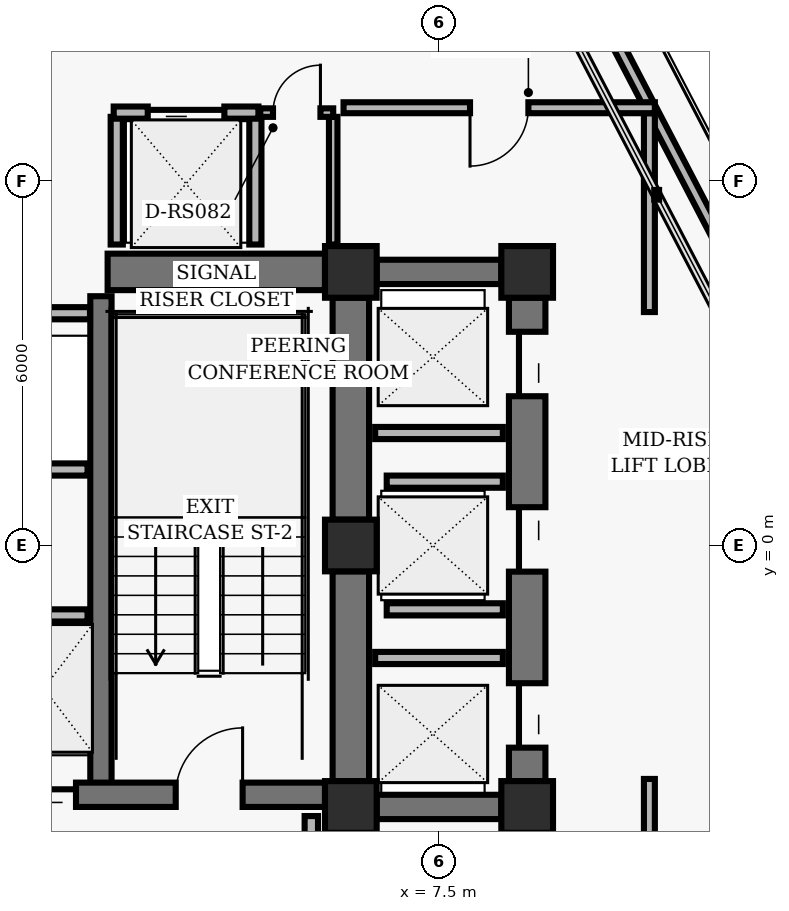
"""IFC4 building model, lengths in metres.
Left out: names, types, materials, properties, quantities, classifications, styles, units other than length and angle.
Written with IfcOpenShell. Run it as: python <this file> out.ifc"""

import sys

from ifc_helpers import new_model, si_unit, direction, frame, frame_2d, origin, origin_2d, place, context, subcontext, project, spatial, rectangle, hollow_rectangle, extrude, element, fill, save


model = new_model("IFC4")
c1 = context("Model", 3, precision=1e-05, world=origin(), true_north=direction((0.0, 1.0)))
c2 = subcontext(c1, "Body", "Model", "MODEL_VIEW")
j1 = project(units=[si_unit("LENGTHUNIT", "METRE"), si_unit("PLANEANGLEUNIT", "RADIAN")], contexts=[c1])
p1 = place(None, origin())
s1 = spatial("IfcSite", under=j1, at=p1, CompositionType="ELEMENT")
p2 = place(p1, origin())
s2 = spatial("IfcBuilding", under=s1, at=p2, CompositionType="ELEMENT")
p3 = place(p2, frame((0.0, 0.0, 125.92)))
s3 = spatial("IfcBuildingStorey", under=s2, at=p3, CompositionType="ELEMENT", Elevation=125.92)
for number, where, z_axis, x_axis in (
    (1, (6.05, 4.5, 0.0), (0.0, 0.0, 1.0), (1.0, 0.0, 0.0)),
    (2, (6.05, 0.0, 0.0), (0.0, 0.0, 1.0), (1.0, 0.0, 0.0)),
    (3, (6.05, -4.3, 0.0), (0.0, 0.0, 1.0), (1.0, 0.0, 0.0)),
    (4, (8.95, 4.5, 0.0), (0.0, 0.0, 1.0), (1.0, 0.0, 0.0)),
    (5, (8.95, -4.3, 0.0), (0.0, 0.0, 1.0), (1.0, 0.0, 0.0)),
):
    element("IfcColumn", number, at=place(p3, frame(where, z_axis=z_axis, x_axis=x_axis)), inside=s3, PredefinedType="COLUMN", context=c2, shape_type="SweptSolid", body=[
        extrude(hollow_rectangle(XDim=0.85, YDim=0.85, WallThickness=0.055, InnerFilletRadius=0.02, OuterFilletRadius=0.04, at=origin_2d()), origin(), (0.0, 0.0, 1.0), 3.04),
    ])
p4 = place(p3, frame((6.05, 0.425, 0.0), z_axis=(0.0, 0.0, 1.0), x_axis=(0.0, 1.0, 0.0)))
e6 = element("IfcWall", 6, at=p4, inside=s3, PredefinedType="SHEAR", context=c2, shape_type="SweptSolid", body=[
    extrude(rectangle(XDim=3.65, YDim=0.6, at=frame_2d((1.825, 0.0))), origin(), (0.0, 0.0, 1.0), 2.788),
])
p5 = place(p3, frame((6.05, -3.875, 0.0), z_axis=(0.0, 0.0, 1.0), x_axis=(0.0, 1.0, 0.0)))
e7 = element("IfcWall", 7, at=p5, inside=s3, PredefinedType="SHEAR", context=c2, shape_type="SweptSolid", body=[
    extrude(rectangle(XDim=3.45, YDim=0.6, at=frame_2d((1.725, 0.0))), origin(), (0.0, 0.0, 1.0), 2.788),
])
p6 = place(p3, frame((1.94, -4.1, 0.0), z_axis=(0.0, 0.0, 1.0), x_axis=(0.0, 1.0, 0.0)))
e8 = element("IfcWall", 8, at=p6, inside=s3, PredefinedType="SHEAR", context=c2, shape_type="SweptSolid", body=[
    extrude(rectangle(XDim=8.2, YDim=0.35, at=frame_2d((4.1, 0.0))), origin(), (0.0, 0.0, 1.0), 2.788),
])
p7 = place(p3, frame((-5.625, -4.1, 0.0), z_axis=(0.0, 0.0, 1.0), x_axis=(1.0, 0.0, 0.0)))
e9 = element("IfcWall", 9, at=p7, inside=s3, PredefinedType="SHEAR", context=c2, shape_type="SweptSolid", body=[
    extrude(rectangle(XDim=11.25, YDim=0.4, at=frame_2d((5.625, 0.0))), origin(), (0.0, 0.0, 1.0), 2.788),
])
p8 = place(p7, frame((1.355, 0.0, 0.0)))
e10 = element("IfcOpeningElement", 10, at=p8, cuts=e9, PredefinedType="OPENING", context=c2, shape_type="SweptSolid", body=[
    extrude(rectangle(XDim=1.1, YDim=2.04, at=frame_2d((0.55, 1.02))), frame((0.0, 0.21, 0.0), z_axis=(0.0, -1.0, 0.0), x_axis=(1.0, 0.0, 0.0)), (0.0, 0.0, 1.0), 0.42),
])
p9 = place(p7, frame((8.795, 0.0, 0.0)))
e11 = element("IfcOpeningElement", 11, at=p9, cuts=e9, PredefinedType="OPENING", context=c2, shape_type="SweptSolid", body=[
    extrude(rectangle(XDim=1.1, YDim=2.04, at=frame_2d((0.55, 1.02))), frame((0.0, 0.21, 0.0), z_axis=(0.0, -1.0, 0.0), x_axis=(1.0, 0.0, 0.0)), (0.0, 0.0, 1.0), 0.42),
])
p10 = place(p7, frame((4.095, 0.0, 0.0)))
e12 = element("IfcOpeningElement", 12, at=p10, cuts=e9, PredefinedType="OPENING", context=c2, shape_type="SweptSolid", body=[
    extrude(rectangle(XDim=1.06, YDim=2.04, at=frame_2d((0.53, 1.02))), frame((0.0, 0.21, 0.0), z_axis=(0.0, -1.0, 0.0), x_axis=(1.0, 0.0, 0.0)), (0.0, 0.0, 1.0), 0.42),
])
p11 = place(p7, frame((6.095, 0.0, 0.0)))
e13 = element("IfcOpeningElement", 13, at=p11, cuts=e9, PredefinedType="OPENING", context=c2, shape_type="SweptSolid", body=[
    extrude(rectangle(XDim=1.06, YDim=2.04, at=frame_2d((0.53, 1.02))), frame((0.0, 0.21, 0.0), z_axis=(0.0, -1.0, 0.0), x_axis=(1.0, 0.0, 0.0)), (0.0, 0.0, 1.0), 0.42),
])
p12 = place(p3, frame((2.05, 4.5, 0.0), z_axis=(0.0, 0.0, 1.0), x_axis=(1.0, 0.0, 0.0)))
e14 = element("IfcWall", 14, at=p12, inside=s3, PredefinedType="SHEAR", context=c2, shape_type="SweptSolid", body=[
    extrude(rectangle(XDim=3.575, YDim=0.6, at=frame_2d((1.788, 0.0))), origin(), (0.0, 0.0, 1.0), 2.788),
])
p13 = place(p3, frame((8.95, -3.875, 0.0), z_axis=(0.0, 0.0, 1.0), x_axis=(0.0, 1.0, 0.0)))
e15 = element("IfcWall", 15, at=p13, inside=s3, PredefinedType="SHEAR", context=c2, shape_type="SweptSolid", body=[
    extrude(rectangle(XDim=7.95, YDim=0.6, at=frame_2d((3.975, 0.0))), origin(), (0.0, 0.0, 1.0), 2.788),
])
p14 = place(p13, frame((0.55, 0.0, 0.0)))
e16 = element("IfcOpeningElement", 16, at=p14, cuts=e15, PredefinedType="OPENING", context=c2, shape_type="SweptSolid", body=[
    extrude(rectangle(XDim=1.06, YDim=2.04, at=frame_2d((0.53, 1.02))), frame((0.0, 0.31, 0.0), z_axis=(0.0, -1.0, 0.0), x_axis=(1.0, 0.0, 0.0)), (0.0, 0.0, 1.0), 0.62),
])
p15 = place(p13, frame((3.445, 0.0, 0.0)))
e17 = element("IfcOpeningElement", 17, at=p15, cuts=e15, PredefinedType="OPENING", context=c2, shape_type="SweptSolid", body=[
    extrude(rectangle(XDim=1.06, YDim=2.04, at=frame_2d((0.53, 1.02))), frame((0.0, 0.31, 0.0), z_axis=(0.0, -1.0, 0.0), x_axis=(1.0, 0.0, 0.0)), (0.0, 0.0, 1.0), 0.62),
])
p16 = place(p13, frame((6.33, 0.0, 0.0)))
e18 = element("IfcOpeningElement", 18, at=p16, cuts=e15, PredefinedType="OPENING", context=c2, shape_type="SweptSolid", body=[
    extrude(rectangle(XDim=1.06, YDim=2.04, at=frame_2d((0.53, 1.02))), frame((0.0, 0.31, 0.0), z_axis=(0.0, -1.0, 0.0), x_axis=(1.0, 0.0, 0.0)), (0.0, 0.0, 1.0), 0.62),
])
for number, where, z_axis, x_axis in (
    (19, (6.475, 4.5, 0.0), (0.0, 0.0, 1.0), (1.0, 0.0, 0.0)),
    (20, (6.475, -4.3, 0.0), (0.0, 0.0, 1.0), (1.0, 0.0, 0.0)),
):
    element("IfcWall", number, at=place(p3, frame(where, z_axis=z_axis, x_axis=x_axis)), inside=s3, PredefinedType="SHEAR", context=c2, shape_type="SweptSolid", body=[
        extrude(rectangle(XDim=2.05, YDim=0.4, at=frame_2d((1.025, 0.0))), origin(), (0.0, 0.0, 1.0), 2.788),
    ])
p17 = place(p3, frame((-1.72, -1.15, 0.0), z_axis=(0.0, 0.0, 1.0), x_axis=(1.0, 0.0, 0.0)))
e21 = element("IfcWall", 21, at=p17, inside=s3, PredefinedType="PARTITIONING", context=c2, shape_type="SweptSolid", body=[
    extrude(rectangle(XDim=3.44, YDim=0.2, at=frame_2d((1.72, 0.0))), origin(), (0.0, 0.0, 1.0), 2.763),
])
p18 = place(p3, frame((5.4, -7.16, 0.0), z_axis=(0.0, 0.0, 1.0), x_axis=(0.0, 1.0, 0.0)))
e22 = element("IfcWall", 22, at=p18, inside=s3, PredefinedType="PARTITIONING", context=c2, shape_type="SweptSolid", body=[
    extrude(rectangle(XDim=2.71, YDim=0.22, at=frame_2d((1.355, 0.0))), origin(), (0.0, 0.0, 1.0), 2.763),
])
p19 = place(p3, frame((-1.72, 1.25, 0.0), z_axis=(0.0, 0.0, 1.0), x_axis=(1.0, 0.0, 0.0)))
e23 = element("IfcWall", 23, at=p19, inside=s3, PredefinedType="PARTITIONING", context=c2, shape_type="SweptSolid", body=[
    extrude(rectangle(XDim=3.44, YDim=0.2, at=frame_2d((1.72, 0.0))), origin(), (0.0, 0.0, 1.0), 2.763),
])
p20 = place(p3, frame((-1.76, 3.82, 0.0), z_axis=(0.0, 0.0, 1.0), x_axis=(1.0, 0.0, 0.0)))
e24 = element("IfcWall", 24, at=p20, inside=s3, PredefinedType="PARTITIONING", context=c2, shape_type="SweptSolid", body=[
    extrude(rectangle(XDim=3.52, YDim=0.2, at=frame_2d((1.76, 0.0))), origin(), (0.0, 0.0, 1.0), 2.763),
])
for number, where, z_axis, x_axis in (
    (25, (2.2, 4.95, 0.0), (0.0, 0.0, 1.0), (0.0, 1.0, 0.0)),
    (26, (4.48, 4.95, 0.0), (0.0, 0.0, 1.0), (0.0, 1.0, 0.0)),
):
    element("IfcWall", number, at=place(p3, frame(where, z_axis=z_axis, x_axis=x_axis)), inside=s3, PredefinedType="PARTITIONING", context=c2, shape_type="SweptSolid", body=[
        extrude(rectangle(XDim=2.1, YDim=0.2, at=frame_2d((1.05, 0.0))), origin(), (0.0, 0.0, 1.0), 2.763),
    ])
p21 = place(p3, frame((2.15, 7.12, 0.0), z_axis=(0.0, 0.0, 1.0), x_axis=(1.0, 0.0, 0.0)))
e27 = element("IfcWall", 27, at=p21, inside=s3, PredefinedType="PARTITIONING", context=c2, shape_type="SweptSolid", body=[
    extrude(rectangle(XDim=2.38, YDim=0.2, at=frame_2d((1.19, 0.0))), origin(), (0.0, 0.0, 1.0), 2.763),
])
p22 = place(p21, frame((0.56, 0.0, 0.0)))
e28 = element("IfcOpeningElement", 28, at=p22, cuts=e27, PredefinedType="OPENING", context=c2, shape_type="SweptSolid", body=[
    extrude(rectangle(XDim=1.26, YDim=2.06, at=frame_2d((0.63, 1.03))), frame((0.0, 0.11, 0.0), z_axis=(0.0, -1.0, 0.0), x_axis=(1.0, 0.0, 0.0)), (0.0, 0.0, 1.0), 0.22),
])
p23 = place(p3, frame((5.76, 4.95, 0.0), z_axis=(0.0, 0.0, 1.0), x_axis=(0.0, 1.0, 0.0)))
e29 = element("IfcWall", 29, at=p23, inside=s3, PredefinedType="PARTITIONING", context=c2, shape_type="SweptSolid", body=[
    extrude(rectangle(XDim=2.1, YDim=0.14, at=frame_2d((1.05, 0.0))), origin(), (0.0, 0.0, 1.0), 2.763),
])
p24 = place(p3, frame((4.56, 7.12, 0.0), z_axis=(0.0, 0.0, 1.0), x_axis=(1.0, 0.0, 0.0)))
e30 = element("IfcWall", 30, at=p24, inside=s3, PredefinedType="PARTITIONING", context=c2, shape_type="SweptSolid", body=[
    extrude(rectangle(XDim=1.2, YDim=0.14, at=frame_2d((0.6, 0.0))), origin(), (0.0, 0.0, 1.0), 2.763),
])
p25 = place(p24, frame((0.21, 0.0, 0.0)))
e31 = element("IfcOpeningElement", 31, at=p25, cuts=e30, PredefinedType="OPENING", context=c2, shape_type="SweptSolid", body=[
    extrude(rectangle(XDim=0.78, YDim=2.01, at=frame_2d((0.39, 1.005))), frame((0.0, 0.08, 0.0), z_axis=(0.0, -1.0, 0.0), x_axis=(1.0, 0.0, 0.0)), (0.0, 0.0, 1.0), 0.16),
])
for number, where, z_axis, x_axis in (
    (32, (6.45, -1.85, 0.0), (0.0, 0.0, 1.0), (1.0, 0.0, 0.0)),
    (33, (6.45, 1.85, 0.0), (0.0, 0.0, 1.0), (1.0, 0.0, 0.0)),
):
    element("IfcWall", number, at=place(p3, frame(where, z_axis=z_axis, x_axis=x_axis)), inside=s3, PredefinedType="PARTITIONING", context=c2, shape_type="SweptSolid", body=[
        extrude(rectangle(XDim=2.1, YDim=0.2, at=frame_2d((1.05, 0.0))), origin(), (0.0, 0.0, 1.0), 2.763),
    ])
for number, where, z_axis, x_axis in (
    (34, (6.64, -1.05, 0.0), (0.0, 0.0, 1.0), (1.0, 0.0, 0.0)),
    (35, (6.64, 1.05, 0.0), (0.0, 0.0, 1.0), (1.0, 0.0, 0.0)),
):
    element("IfcWall", number, at=place(p3, frame(where, z_axis=z_axis, x_axis=x_axis)), inside=s3, PredefinedType="PARTITIONING", context=c2, shape_type="SweptSolid", body=[
        extrude(rectangle(XDim=1.91, YDim=0.2, at=frame_2d((0.955, 0.0))), origin(), (0.0, 0.0, 1.0), 2.763),
    ])
p26 = place(p3, frame((10.003, 9.07, 0.0), z_axis=(0.0, 0.0, 1.0), x_axis=(0.461740291408, -0.887015165198, 0.0)))
e36 = element("IfcWall", 36, at=p26, inside=s3, PredefinedType="PARTITIONING", context=c2, shape_type="SweptSolid", body=[
    extrude(rectangle(XDim=9.976, YDim=0.18, at=frame_2d((4.988, 0.0))), origin(), (0.0, 0.0, 1.0), 2.763),
])
p27 = place(p3, frame((10.96, -7.11, 0.0), z_axis=(0.0, 0.0, 1.0), x_axis=(0.0, 1.0, 0.0)))
e37 = element("IfcWall", 37, at=p27, inside=s3, PredefinedType="PARTITIONING", context=c2, shape_type="SweptSolid", body=[
    extrude(rectangle(XDim=3.271, YDim=0.18, at=frame_2d((1.635, 0.0))), origin(), (0.0, 0.0, 1.0), 2.763),
])
p28 = place(p27, frame((1.125, 0.0, 0.0)))
e38 = element("IfcOpeningElement", 38, at=p28, cuts=e37, PredefinedType="OPENING", context=c2, shape_type="SweptSolid", body=[
    extrude(rectangle(XDim=1.02, YDim=2.02, at=frame_2d((0.51, 1.01))), frame((0.0, 0.1, 0.0), z_axis=(0.0, -1.0, 0.0), x_axis=(1.0, 0.0, 0.0)), (0.0, 0.0, 1.0), 0.2),
])
p29 = place(p3, frame((10.96, 3.84, 0.0), z_axis=(0.0, 0.0, 1.0), x_axis=(0.0, 1.0, 0.0)))
e39 = element("IfcWall", 39, at=p29, inside=s3, PredefinedType="PARTITIONING", context=c2, shape_type="SweptSolid", body=[
    extrude(rectangle(XDim=3.271, YDim=0.18, at=frame_2d((1.635, 0.0))), origin(), (0.0, 0.0, 1.0), 2.763),
])
p30 = place(p3, frame((11.05, 7.2, 0.0), z_axis=(0.0, 0.0, 1.0), x_axis=(-1.0, 0.0, 0.0)))
e40 = element("IfcWall", 40, at=p30, inside=s3, PredefinedType="PARTITIONING", context=c2, shape_type="SweptSolid", body=[
    extrude(rectangle(XDim=5.12, YDim=0.18, at=frame_2d((2.56, 0.0))), origin(), (0.0, 0.0, 1.0), 2.763),
])
p31 = place(p30, frame((2.08, 0.0, 0.0)))
e41 = element("IfcOpeningElement", 41, at=p31, cuts=e40, PredefinedType="OPENING", context=c2, shape_type="SweptSolid", body=[
    extrude(rectangle(XDim=0.96, YDim=2.02, at=frame_2d((0.48, 1.01))), frame((0.0, 0.1, 0.0), z_axis=(0.0, -1.0, 0.0), x_axis=(1.0, 0.0, 0.0)), (0.0, 0.0, 1.0), 0.2),
])
p32 = place(p9, origin())
e42 = element("IfcDoor", 42, at=p32, inside=s3, OperationType="SINGLE_SWING_RIGHT", PredefinedType="DOOR", context=c2, shape_type="SweptSolid", body=[
    extrude(rectangle(XDim=1.1, YDim=2.04, at=frame_2d((0.55, 1.02))), frame((0.0, 0.025, 0.0), z_axis=(0.0, -1.0, 0.0), x_axis=(1.0, 0.0, 0.0)), (0.0, 0.0, 1.0), 0.05),
])
fill(e11, e42)
p33 = place(p11, origin())
e43 = element("IfcDoor", 43, at=p33, inside=s3, OperationType="SLIDING_TO_RIGHT", PredefinedType="DOOR", context=c2, shape_type="SweptSolid", body=[
    extrude(rectangle(XDim=1.06, YDim=2.04, at=frame_2d((0.53, 1.02))), frame((0.0, 0.025, 0.0), z_axis=(0.0, -1.0, 0.0), x_axis=(1.0, 0.0, 0.0)), (0.0, 0.0, 1.0), 0.05),
])
fill(e13, e43)
p34 = place(p22, origin())
e44 = element("IfcDoor", 44, at=p34, inside=s3, OperationType="SLIDING_TO_LEFT", PredefinedType="DOOR", context=c2, shape_type="SweptSolid", body=[
    extrude(rectangle(XDim=1.26, YDim=2.06, at=frame_2d((0.63, 1.03))), frame((0.0, 0.025, 0.0), z_axis=(0.0, -1.0, 0.0), x_axis=(1.0, 0.0, 0.0)), (0.0, 0.0, 1.0), 0.05),
])
fill(e28, e44)
p35 = place(p25, origin())
e45 = element("IfcDoor", 45, at=p35, inside=s3, OperationType="SINGLE_SWING_RIGHT", PredefinedType="DOOR", context=c2, shape_type="SweptSolid", body=[
    extrude(rectangle(XDim=0.78, YDim=2.01, at=frame_2d((0.39, 1.005))), frame((0.0, 0.025, 0.0), z_axis=(0.0, -1.0, 0.0), x_axis=(1.0, 0.0, 0.0)), (0.0, 0.0, 1.0), 0.05),
])
fill(e31, e45)
p36 = place(p14, origin())
e46 = element("IfcDoor", 46, at=p36, inside=s3, OperationType="SLIDING_TO_LEFT", PredefinedType="DOOR", context=c2, shape_type="SweptSolid", body=[
    extrude(rectangle(XDim=1.06, YDim=2.04, at=frame_2d((0.53, 1.02))), frame((0.0, 0.025, 0.0), z_axis=(0.0, -1.0, 0.0), x_axis=(1.0, 0.0, 0.0)), (0.0, 0.0, 1.0), 0.05),
])
fill(e16, e46)
p37 = place(p15, origin())
e47 = element("IfcDoor", 47, at=p37, inside=s3, OperationType="SLIDING_TO_RIGHT", PredefinedType="DOOR", context=c2, shape_type="SweptSolid", body=[
    extrude(rectangle(XDim=1.06, YDim=2.04, at=frame_2d((0.53, 1.02))), frame((0.0, 0.025, 0.0), z_axis=(0.0, -1.0, 0.0), x_axis=(1.0, 0.0, 0.0)), (0.0, 0.0, 1.0), 0.05),
])
fill(e17, e47)
p38 = place(p16, origin())
e48 = element("IfcDoor", 48, at=p38, inside=s3, OperationType="SLIDING_TO_LEFT", PredefinedType="DOOR", context=c2, shape_type="SweptSolid", body=[
    extrude(rectangle(XDim=1.06, YDim=2.04, at=frame_2d((0.53, 1.02))), frame((0.0, 0.025, 0.0), z_axis=(0.0, -1.0, 0.0), x_axis=(1.0, 0.0, 0.0)), (0.0, 0.0, 1.0), 0.05),
])
fill(e18, e48)
p39 = place(p31, origin())
e49 = element("IfcDoor", 49, at=p39, inside=s3, OperationType="SINGLE_SWING_RIGHT", PredefinedType="DOOR", context=c2, shape_type="SweptSolid", body=[
    extrude(rectangle(XDim=0.96, YDim=2.02, at=frame_2d((0.48, 1.01))), frame((0.0, 0.025, 0.0), z_axis=(0.0, -1.0, 0.0), x_axis=(1.0, 0.0, 0.0)), (0.0, 0.0, 1.0), 0.05),
])
fill(e41, e49)
save(model, sys.argv[1])
